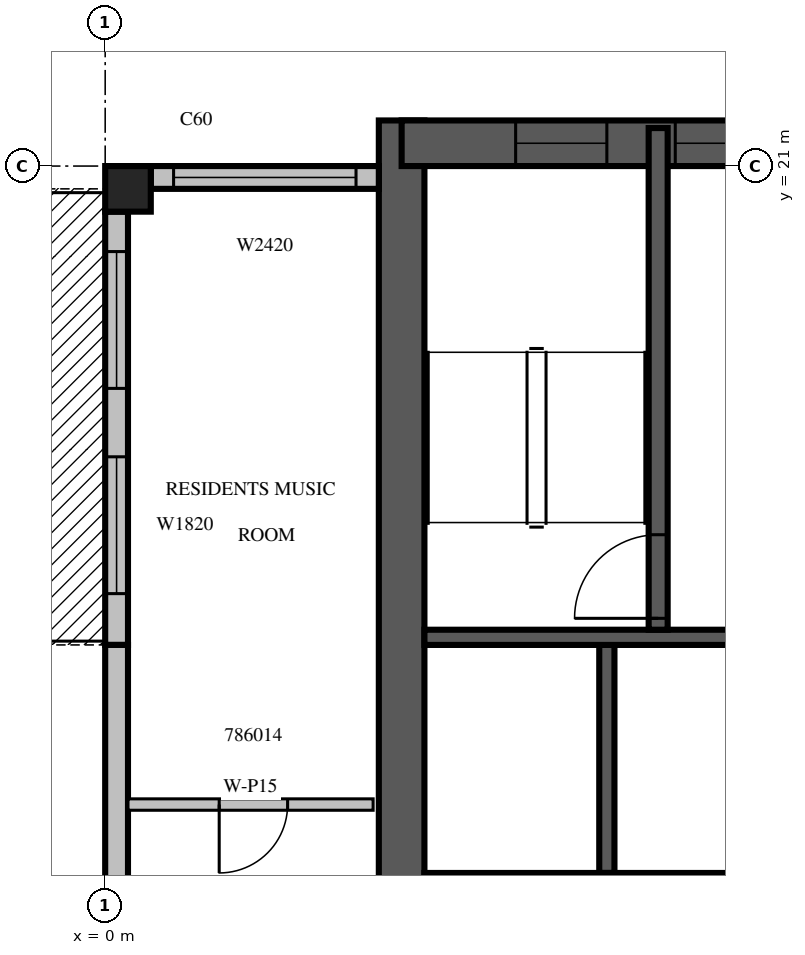
"""IFC4 building model, lengths in metres.
Left out: names, types, materials, properties, quantities, classifications, styles, units other than length and angle.
Written with IfcOpenShell. Run it as: python <this file> out.ifc"""

import sys

from ifc_helpers import new_model, si_unit, direction, frame, frame_2d, origin, origin_2d, place, context, subcontext, project, spatial, rectangle, extrude, source, transform, mapped, element, fill, save


model = new_model("IFC4")
c1 = context("Model", 3, precision=1e-05, world=origin(), true_north=direction((0.0, 1.0)))
c2 = subcontext(c1, "Body", "Model", "MODEL_VIEW")
j1 = project(units=[si_unit("LENGTHUNIT", "METRE"), si_unit("PLANEANGLEUNIT", "RADIAN")], contexts=[c1])
p1 = place(None, origin())
s1 = spatial("IfcSite", under=j1, at=p1, CompositionType="ELEMENT")
p2 = place(p1, origin())
s2 = spatial("IfcBuilding", under=s1, at=p2, CompositionType="ELEMENT")
p3 = place(p2, frame((0.0, 0.0, 361.5)))
s3 = spatial("IfcBuildingStorey", under=s2, at=p3, CompositionType="ELEMENT", Elevation=361.5)
m1 = source(origin(), c2, "Body", "SweptSolid", [
    extrude(rectangle(XDim=0.6, YDim=0.6, at=origin_2d()), origin(), (0.0, 0.0, 1.0), 3.5),
])
p4 = place(p3, frame((0.3, 20.7, 0.0), z_axis=(0.0, 0.0, 1.0), x_axis=(1.0, 0.0, 0.0)))
e1 = element("IfcColumn", 1, at=p4, inside=s3, PredefinedType="COLUMN", context=c2, shape_type="MappedRepresentation", body=[
    mapped(m1, transform((0.0, 0.0, 0.0), scale=1.0)),
])
m2 = source(origin(), c2, "Body", "SweptSolid", [
    extrude(rectangle(XDim=17.4, YDim=0.6, at=frame_2d((8.7, 0.0))), origin(), (0.0, 0.0, 1.0), 3.5),
])
p5 = place(p3, frame((3.9, 4.2, 0.0), z_axis=(0.0, 0.0, 1.0), x_axis=(0.0, 1.0, 0.0)))
e2 = element("IfcWall", 2, at=p5, inside=s3, PredefinedType="SHEAR", context=c2, shape_type="MappedRepresentation", body=[
    mapped(m2, transform((0.0, 0.0, 0.0), scale=1.0)),
])
m3 = source(origin(), c2, "Body", "SweptSolid", [
    extrude(rectangle(XDim=2.2, YDim=2.1, at=frame_2d((1.1, 1.05))), frame((0.0, 0.31, 0.0), z_axis=(0.0, -1.0, 0.0), x_axis=(1.0, 0.0, 0.0)), (0.0, 0.0, 1.0), 0.62),
])
p6 = place(p5, frame((4.2, 0.0, 0.0)))
e3 = element("IfcOpeningElement", 3, at=p6, cuts=e2, PredefinedType="OPENING", context=c2, shape_type="MappedRepresentation", body=[
    mapped(m3, transform((0.0, 0.0, 0.0), scale=1.0)),
])
m4 = source(origin(), c2, "Body", "SweptSolid", [
    extrude(rectangle(XDim=6.6, YDim=0.6, at=frame_2d((3.3, 0.0))), origin(), (0.0, 0.0, 1.0), 3.5),
])
p7 = place(p3, frame((3.9, 21.3, 0.0), z_axis=(0.0, 0.0, 1.0), x_axis=(1.0, 0.0, 0.0)))
e4 = element("IfcWall", 4, at=p7, inside=s3, PredefinedType="SHEAR", context=c2, shape_type="MappedRepresentation", body=[
    mapped(m4, transform((0.0, 0.0, 0.0), scale=1.0)),
])
m5 = source(origin(), c2, "Body", "SweptSolid", [
    extrude(rectangle(XDim=1.2, YDim=2.4, at=frame_2d((0.6, 1.2))), frame((0.0, 0.31, 0.0), z_axis=(0.0, -1.0, 0.0), x_axis=(1.0, 0.0, 0.0)), (0.0, 0.0, 1.0), 0.62),
])
p8 = place(p7, frame((1.5, 0.0, 0.6)))
e5 = element("IfcOpeningElement", 5, at=p8, cuts=e4, PredefinedType="OPENING", context=c2, shape_type="MappedRepresentation", body=[
    mapped(m5, transform((0.0, 0.0, 0.0), scale=1.0)),
])
p9 = place(p7, frame((3.6, 0.0, 0.6)))
e6 = element("IfcOpeningElement", 6, at=p9, cuts=e4, PredefinedType="OPENING", context=c2, shape_type="MappedRepresentation", body=[
    mapped(m5, transform((0.0, 0.0, 0.0), scale=1.0)),
])
m6 = source(origin(), c2, "Body", "SweptSolid", [
    extrude(rectangle(XDim=3.0, YDim=0.3, at=frame_2d((1.5, 0.0))), origin(), (0.0, 0.0, 1.0), 3.1),
])
p10 = place(p3, frame((3.6, 20.85, 0.0), z_axis=(0.0, 0.0, 1.0), x_axis=(-1.0, 0.0, 0.0)))
e7 = element("IfcWall", 7, at=p10, inside=s3, PredefinedType="STANDARD", context=c2, shape_type="MappedRepresentation", body=[
    mapped(m6, transform((0.0, 0.0, 0.0), scale=1.0)),
])
m7 = source(origin(), c2, "Body", "SweptSolid", [
    extrude(rectangle(XDim=2.4, YDim=2.0, at=frame_2d((1.2, 1.0))), frame((0.0, 0.16, 0.0), z_axis=(0.0, -1.0, 0.0), x_axis=(1.0, 0.0, 0.0)), (0.0, 0.0, 1.0), 0.32),
])
p11 = place(p10, frame((0.3, 0.0, 0.6)))
e8 = element("IfcOpeningElement", 8, at=p11, cuts=e7, PredefinedType="OPENING", context=c2, shape_type="MappedRepresentation", body=[
    mapped(m7, transform((0.0, 0.0, 0.0), scale=1.0)),
])
m8 = source(origin(), c2, "Body", "SweptSolid", [
    extrude(rectangle(XDim=5.7, YDim=0.3, at=frame_2d((2.85, 0.0))), origin(), (0.0, 0.0, 1.0), 3.1),
])
p12 = place(p3, frame((0.15, 20.4, 0.0), z_axis=(0.0, 0.0, 1.0), x_axis=(0.0, -1.0, 0.0)))
e9 = element("IfcWall", 9, at=p12, inside=s3, PredefinedType="STANDARD", context=c2, shape_type="MappedRepresentation", body=[
    mapped(m8, transform((0.0, 0.0, 0.0), scale=1.0)),
])
m9 = source(origin(), c2, "Body", "SweptSolid", [
    extrude(rectangle(XDim=1.8, YDim=2.4, at=frame_2d((0.9, 1.2))), frame((0.0, 0.16, 0.0), z_axis=(0.0, -1.0, 0.0), x_axis=(1.0, 0.0, 0.0)), (0.0, 0.0, 1.0), 0.32),
])
p13 = place(p12, frame((0.525, 0.0, 0.0)))
e10 = element("IfcOpeningElement", 10, at=p13, cuts=e9, PredefinedType="OPENING", context=c2, shape_type="MappedRepresentation", body=[
    mapped(m9, transform((0.0, 0.0, 0.0), scale=1.0)),
])
m10 = source(origin(), c2, "Body", "SweptSolid", [
    extrude(rectangle(XDim=1.8, YDim=2.0, at=frame_2d((0.9, 1.0))), frame((0.0, 0.16, 0.0), z_axis=(0.0, -1.0, 0.0), x_axis=(1.0, 0.0, 0.0)), (0.0, 0.0, 1.0), 0.32),
])
p14 = place(p12, frame((3.225, 0.0, 0.6)))
e11 = element("IfcOpeningElement", 11, at=p14, cuts=e9, PredefinedType="OPENING", context=c2, shape_type="MappedRepresentation", body=[
    mapped(m10, transform((0.0, 0.0, 0.0), scale=1.0)),
])
m11 = source(origin(), c2, "Body", "SweptSolid", [
    extrude(rectangle(XDim=3.9, YDim=0.3, at=frame_2d((1.95, 0.0))), origin(), (0.0, 0.0, 1.0), 3.1),
])
p15 = place(p3, frame((0.15, 14.7, 0.0), z_axis=(0.0, 0.0, 1.0), x_axis=(0.0, -1.0, 0.0)))
e12 = element("IfcWall", 12, at=p15, inside=s3, PredefinedType="STANDARD", context=c2, shape_type="MappedRepresentation", body=[
    mapped(m11, transform((0.0, 0.0, 0.0), scale=1.0)),
])
m12 = source(origin(), c2, "Body", "SweptSolid", [
    extrude(rectangle(XDim=3.0, YDim=0.2, at=frame_2d((1.5, 0.0))), origin(), (0.0, 0.0, 1.0), 3.5),
])
p16 = place(p3, frame((6.6, 11.7, 0.0), z_axis=(0.0, 0.0, 1.0), x_axis=(0.0, 1.0, 0.0)))
e13 = element("IfcWall", 13, at=p16, inside=s3, PredefinedType="SOLIDWALL", context=c2, shape_type="MappedRepresentation", body=[
    mapped(m12, transform((0.0, 0.0, 0.0), scale=1.0)),
])
m13 = source(origin(), c2, "Body", "SweptSolid", [
    extrude(rectangle(XDim=4.8, YDim=0.2, at=frame_2d((2.4, 0.0))), origin(), (0.0, 0.0, 1.0), 3.5),
])
p17 = place(p3, frame((4.2, 11.6, 0.0), z_axis=(0.0, 0.0, 1.0), x_axis=(1.0, 0.0, 0.0)))
e14 = element("IfcWall", 14, at=p17, inside=s3, PredefinedType="SOLIDWALL", context=c2, shape_type="MappedRepresentation", body=[
    mapped(m13, transform((0.0, 0.0, 0.0), scale=1.0)),
])
m14 = source(origin(), c2, "Body", "SweptSolid", [
    extrude(rectangle(XDim=1.1, YDim=2.1, at=frame_2d((0.55, 1.05))), frame((0.0, 0.11, 0.0), z_axis=(0.0, -1.0, 0.0), x_axis=(1.0, 0.0, 0.0)), (0.0, 0.0, 1.0), 0.22),
])
p18 = place(p17, frame((0.65, 0.0, 0.0)))
e15 = element("IfcOpeningElement", 15, at=p18, cuts=e14, PredefinedType="OPENING", context=c2, shape_type="MappedRepresentation", body=[
    mapped(m14, transform((0.0, 0.0, 0.0), scale=1.0)),
])
p19 = place(p17, frame((3.05, 0.0, 0.0)))
e16 = element("IfcOpeningElement", 16, at=p19, cuts=e14, PredefinedType="OPENING", context=c2, shape_type="MappedRepresentation", body=[
    mapped(m14, transform((0.0, 0.0, 0.0), scale=1.0)),
])
p20 = place(p3, frame((4.2, 14.8, 0.0), z_axis=(0.0, 0.0, 1.0), x_axis=(1.0, 0.0, 0.0)))
e17 = element("IfcWall", 17, at=p20, inside=s3, PredefinedType="SOLIDWALL", context=c2, shape_type="MappedRepresentation", body=[
    mapped(m13, transform((0.0, 0.0, 0.0), scale=1.0)),
])
m15 = source(origin(), c2, "Body", "SweptSolid", [
    extrude(rectangle(XDim=6.6, YDim=0.25, at=frame_2d((3.3, 0.0))), origin(), (0.0, 0.0, 1.0), 3.1),
])
p21 = place(p3, frame((7.275, 14.9, 0.0), z_axis=(0.0, 0.0, 1.0), x_axis=(0.0, 1.0, 0.0)))
e18 = element("IfcWall", 18, at=p21, inside=s3, PredefinedType="SOLIDWALL", context=c2, shape_type="MappedRepresentation", body=[
    mapped(m15, transform((0.0, 0.0, 0.0), scale=1.0)),
])
m16 = source(origin(), c2, "Body", "SweptSolid", [
    extrude(rectangle(XDim=1.1, YDim=2.1, at=frame_2d((0.55, 1.05))), frame((0.0, 0.135, 0.0), z_axis=(0.0, -1.0, 0.0), x_axis=(1.0, 0.0, 0.0)), (0.0, 0.0, 1.0), 0.27),
])
p22 = place(p21, frame((0.15, 0.0, 0.0)))
e19 = element("IfcOpeningElement", 19, at=p22, cuts=e18, PredefinedType="OPENING", context=c2, shape_type="MappedRepresentation", body=[
    mapped(m16, transform((0.0, 0.0, 0.0), scale=1.0)),
])
m17 = source(origin(), c2, "Body", "SweptSolid", [
    extrude(rectangle(XDim=3.225, YDim=0.15, at=frame_2d((1.613, 0.0))), origin(), (0.0, 0.0, 1.0), 3.1),
])
p23 = place(p3, frame((0.3, 12.6, 0.0), z_axis=(0.0, 0.0, 1.0), x_axis=(1.0, 0.0, 0.0)))
e20 = element("IfcWall", 20, at=p23, inside=s3, PredefinedType="PARTITIONING", context=c2, shape_type="MappedRepresentation", body=[
    mapped(m17, transform((0.0, 0.0, 0.0), scale=1.0)),
])
m18 = source(origin(), c2, "Body", "SweptSolid", [
    extrude(rectangle(XDim=0.9, YDim=2.1, at=frame_2d((0.45, 1.05))), frame((0.0, 0.085, 0.0), z_axis=(0.0, -1.0, 0.0), x_axis=(1.0, 0.0, 0.0)), (0.0, 0.0, 1.0), 0.17),
])
p24 = place(p23, frame((1.2, 0.0, 0.0)))
e21 = element("IfcOpeningElement", 21, at=p24, cuts=e20, PredefinedType="OPENING", context=c2, shape_type="MappedRepresentation", body=[
    mapped(m18, transform((0.0, 0.0, 0.0), scale=1.0)),
])
m19 = source(origin(), c2, "Body", "SweptSolid", [
    extrude(rectangle(XDim=2.4, YDim=2.0, at=frame_2d((1.2, 1.0))), frame((0.0, 0.03, 0.0), z_axis=(0.0, -1.0, 0.0), x_axis=(1.0, 0.0, 0.0)), (0.0, 0.0, 1.0), 0.06),
])
p25 = place(p11, origin())
e22 = element("IfcWindow", 22, at=p25, inside=s3, PartitioningType="SINGLE_PANEL", PredefinedType="WINDOW", context=c2, shape_type="MappedRepresentation", body=[
    mapped(m19, transform((0.0, 0.0, 0.0), scale=1.0)),
])
fill(e8, e22)
m20 = source(origin(), c2, "Body", "SweptSolid", [
    extrude(rectangle(XDim=1.8, YDim=2.4, at=frame_2d((0.9, 1.2))), frame((0.0, 0.025, 0.0), z_axis=(0.0, -1.0, 0.0), x_axis=(1.0, 0.0, 0.0)), (0.0, 0.0, 1.0), 0.05),
])
p26 = place(p13, origin())
e23 = element("IfcDoor", 23, at=p26, inside=s3, OperationType="SLIDING_TO_LEFT", PredefinedType="DOOR", context=c2, shape_type="MappedRepresentation", body=[
    mapped(m20, transform((0.0, 0.0, 0.0), scale=1.0)),
])
fill(e10, e23)
m21 = source(origin(), c2, "Body", "SweptSolid", [
    extrude(rectangle(XDim=1.8, YDim=2.0, at=frame_2d((0.9, 1.0))), frame((0.0, 0.03, 0.0), z_axis=(0.0, -1.0, 0.0), x_axis=(1.0, 0.0, 0.0)), (0.0, 0.0, 1.0), 0.06),
])
p27 = place(p14, origin())
e24 = element("IfcWindow", 24, at=p27, inside=s3, PartitioningType="SINGLE_PANEL", PredefinedType="WINDOW", context=c2, shape_type="MappedRepresentation", body=[
    mapped(m21, transform((0.0, 0.0, 0.0), scale=1.0)),
])
fill(e11, e24)
m22 = source(origin(), c2, "Body", "SweptSolid", [
    extrude(rectangle(XDim=1.1, YDim=2.1, at=frame_2d((0.55, 1.05))), frame((0.0, 0.025, 0.0), z_axis=(0.0, -1.0, 0.0), x_axis=(1.0, 0.0, 0.0)), (0.0, 0.0, 1.0), 0.05),
])
p28 = place(p22, origin())
e25 = element("IfcDoor", 25, at=p28, inside=s3, OperationType="SINGLE_SWING_LEFT", PredefinedType="DOOR", context=c2, shape_type="MappedRepresentation", body=[
    mapped(m22, transform((0.0, 0.0, 0.0), scale=1.0)),
])
fill(e19, e25)
m23 = source(origin(), c2, "Body", "SweptSolid", [
    extrude(rectangle(XDim=1.2, YDim=2.4, at=frame_2d((0.6, 1.2))), frame((0.0, 0.03, 0.0), z_axis=(0.0, -1.0, 0.0), x_axis=(1.0, 0.0, 0.0)), (0.0, 0.0, 1.0), 0.06),
])
p29 = place(p8, origin())
e26 = element("IfcWindow", 26, at=p29, inside=s3, PartitioningType="SINGLE_PANEL", PredefinedType="WINDOW", context=c2, shape_type="MappedRepresentation", body=[
    mapped(m23, transform((0.0, 0.0, 0.0), scale=1.0)),
])
fill(e5, e26)
p30 = place(p9, origin())
e27 = element("IfcWindow", 27, at=p30, inside=s3, PartitioningType="SINGLE_PANEL", PredefinedType="WINDOW", context=c2, shape_type="MappedRepresentation", body=[
    mapped(m23, transform((0.0, 0.0, 0.0), scale=1.0)),
])
fill(e6, e27)
m24 = source(origin(), c2, "Body", "SweptSolid", [
    extrude(rectangle(XDim=0.9, YDim=2.1, at=frame_2d((0.45, 1.05))), frame((0.0, 0.025, 0.0), z_axis=(0.0, -1.0, 0.0), x_axis=(1.0, 0.0, 0.0)), (0.0, 0.0, 1.0), 0.05),
])
p31 = place(p24, origin())
e28 = element("IfcDoor", 28, at=p31, inside=s3, OperationType="SINGLE_SWING_RIGHT", PredefinedType="DOOR", context=c2, shape_type="MappedRepresentation", body=[
    mapped(m24, transform((0.0, 0.0, 0.0), scale=1.0)),
])
fill(e21, e28)
save(model, sys.argv[1])
